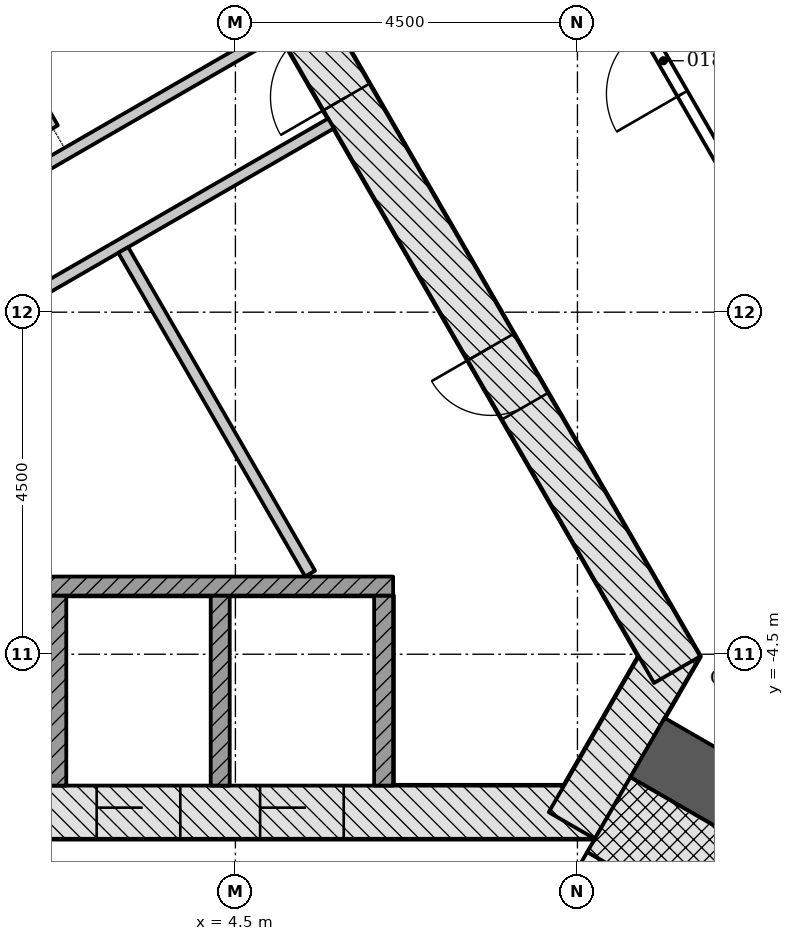
"""IFC4 building model, lengths in metres.
Left out: names, types, materials, properties, quantities, classifications, styles, units other than length and angle.
Written with IfcOpenShell. Run it as: python <this file> out.ifc"""

import sys

from ifc_helpers import new_model, si_unit, direction, frame, frame_2d, origin, place, context, subcontext, project, spatial, rectangle, extrude, element, fill, save


model = new_model("IFC4")
c1 = context("Model", 3, precision=1e-05, world=origin(), true_north=direction((0.0, 1.0)))
c2 = subcontext(c1, "Body", "Model", "MODEL_VIEW")
j1 = project(units=[si_unit("LENGTHUNIT", "METRE"), si_unit("PLANEANGLEUNIT", "RADIAN")], contexts=[c1])
p1 = place(None, origin())
s1 = spatial("IfcSite", under=j1, at=p1, CompositionType="ELEMENT")
p2 = place(p1, origin())
s2 = spatial("IfcBuilding", under=s1, at=p2, CompositionType="ELEMENT")
p3 = place(p2, frame((0.0, 0.0, 6.0)))
s3 = spatial("IfcBuildingStorey", under=s2, at=p3, CompositionType="ELEMENT", Elevation=6.0)
p4 = place(p3, frame((-9.229, -6.578, -0.25), z_axis=(0.0, 0.0, 1.0), x_axis=(1.0, 0.0, 0.0)))
e1 = element("IfcWall", 1, at=p4, inside=s3, PredefinedType="SHEAR", context=c2, shape_type="SweptSolid", body=[
    extrude(rectangle(XDim=18.458, YDim=0.7, at=frame_2d((9.229, 0.0))), origin(), (0.0, 0.0, 1.0), 4.5),
])
p5 = place(p4, frame((3.304, 0.0, 0.25)))
e2 = element("IfcOpeningElement", 2, at=p5, cuts=e1, PredefinedType="OPENING", context=c2, shape_type="SweptSolid", body=[
    extrude(rectangle(XDim=1.1, YDim=2.1, at=frame_2d((0.55, 1.05))), frame((0.0, 0.36, 0.0), z_axis=(0.0, -1.0, 0.0), x_axis=(1.0, 0.0, 0.0)), (0.0, 0.0, 1.0), 0.72),
])
p6 = place(p4, frame((5.454, 0.0, 0.25)))
e3 = element("IfcOpeningElement", 3, at=p6, cuts=e1, PredefinedType="OPENING", context=c2, shape_type="SweptSolid", body=[
    extrude(rectangle(XDim=1.1, YDim=2.1, at=frame_2d((0.55, 1.05))), frame((0.0, 0.36, 0.0), z_axis=(0.0, -1.0, 0.0), x_axis=(1.0, 0.0, 0.0)), (0.0, 0.0, 1.0), 0.72),
])
p7 = place(p4, frame((7.604, 0.0, 0.25)))
e4 = element("IfcOpeningElement", 4, at=p7, cuts=e1, PredefinedType="OPENING", context=c2, shape_type="SweptSolid", body=[
    extrude(rectangle(XDim=1.1, YDim=2.1, at=frame_2d((0.55, 1.05))), frame((0.0, 0.36, 0.0), z_axis=(0.0, -1.0, 0.0), x_axis=(1.0, 0.0, 0.0)), (0.0, 0.0, 1.0), 0.72),
])
p8 = place(p4, frame((9.754, 0.0, 0.25)))
e5 = element("IfcOpeningElement", 5, at=p8, cuts=e1, PredefinedType="OPENING", context=c2, shape_type="SweptSolid", body=[
    extrude(rectangle(XDim=1.1, YDim=2.1, at=frame_2d((0.55, 1.05))), frame((0.0, 0.36, 0.0), z_axis=(0.0, -1.0, 0.0), x_axis=(1.0, 0.0, 0.0)), (0.0, 0.0, 1.0), 0.72),
])
p9 = place(p4, frame((11.904, 0.0, 0.25)))
e6 = element("IfcOpeningElement", 6, at=p9, cuts=e1, PredefinedType="OPENING", context=c2, shape_type="SweptSolid", body=[
    extrude(rectangle(XDim=1.1, YDim=2.1, at=frame_2d((0.55, 1.05))), frame((0.0, 0.36, 0.0), z_axis=(0.0, -1.0, 0.0), x_axis=(1.0, 0.0, 0.0)), (0.0, 0.0, 1.0), 0.72),
])
p10 = place(p4, frame((14.054, 0.0, 0.25)))
e7 = element("IfcOpeningElement", 7, at=p10, cuts=e1, PredefinedType="OPENING", context=c2, shape_type="SweptSolid", body=[
    extrude(rectangle(XDim=1.1, YDim=2.1, at=frame_2d((0.55, 1.05))), frame((0.0, 0.36, 0.0), z_axis=(0.0, -1.0, 0.0), x_axis=(1.0, 0.0, 0.0)), (0.0, 0.0, 1.0), 0.72),
])
p11 = place(p4, frame((1.079, 0.0, 0.25)))
e8 = element("IfcOpeningElement", 8, at=p11, cuts=e1, PredefinedType="OPENING", context=c2, shape_type="SweptSolid", body=[
    extrude(rectangle(XDim=0.9, YDim=2.1, at=frame_2d((0.45, 1.05))), frame((0.0, 0.36, 0.0), z_axis=(0.0, -1.0, 0.0), x_axis=(1.0, 0.0, 0.0)), (0.0, 0.0, 1.0), 0.72),
])
p12 = place(p3, frame((8.926, -6.753, -0.25), z_axis=(0.0, 0.0, 1.0), x_axis=(0.500042739161, 0.866000726912, 0.0)))
e9 = element("IfcWall", 9, at=p12, inside=s3, PredefinedType="SHEAR", context=c2, shape_type="SweptSolid", body=[
    extrude(rectangle(XDim=2.771, YDim=0.7, at=frame_2d((1.386, 0.0))), origin(), (0.0, 0.0, 1.0), 4.5),
])
p13 = place(p3, frame((10.311, -4.703, -0.25), z_axis=(0.0, 0.0, 1.0), x_axis=(-0.500001446645, 0.866024568562, 0.0)))
e10 = element("IfcWall", 10, at=p13, inside=s3, PredefinedType="SHEAR", context=c2, shape_type="SweptSolid", body=[
    extrude(rectangle(XDim=18.458, YDim=0.7, at=frame_2d((9.229, 0.0))), origin(), (0.0, 0.0, 1.0), 4.5),
])
p14 = place(p13, frame((8.7, 0.0, 0.25)))
e11 = element("IfcOpeningElement", 11, at=p14, cuts=e10, PredefinedType="OPENING", context=c2, shape_type="SweptSolid", body=[
    extrude(rectangle(XDim=1.0, YDim=2.1, at=frame_2d((0.5, 1.05))), frame((0.0, 0.36, 0.0), z_axis=(0.0, -1.0, 0.0), x_axis=(1.0, 0.0, 0.0)), (0.0, 0.0, 1.0), 0.72),
])
p15 = place(p13, frame((4.002, 0.0, 0.25)))
e12 = element("IfcOpeningElement", 12, at=p15, cuts=e10, PredefinedType="OPENING", context=c2, shape_type="SweptSolid", body=[
    extrude(rectangle(XDim=0.9, YDim=2.1, at=frame_2d((0.45, 1.05))), frame((0.0, 0.36, 0.0), z_axis=(0.0, -1.0, 0.0), x_axis=(1.0, 0.0, 0.0)), (0.0, 0.0, 1.0), 0.72),
])
p16 = place(p13, frame((14.093, 0.0, 0.25)))
e13 = element("IfcOpeningElement", 13, at=p16, cuts=e10, PredefinedType="OPENING", context=c2, shape_type="SweptSolid", body=[
    extrude(rectangle(XDim=0.9, YDim=2.1, at=frame_2d((0.45, 1.05))), frame((0.0, 0.36, 0.0), z_axis=(0.0, -1.0, 0.0), x_axis=(1.0, 0.0, 0.0)), (0.0, 0.0, 1.0), 0.72),
])
p17 = place(p3, frame((9.922, -5.728, -0.25), z_axis=(0.0, 0.0, 1.0), x_axis=(0.866028046028, -0.499995423472, 0.0)))
e14 = element("IfcWall", 14, at=p17, inside=s3, PredefinedType="SHEAR", context=c2, shape_type="SweptSolid", body=[
    extrude(rectangle(XDim=14.633, YDim=0.9, at=frame_2d((7.316, 0.0))), origin(), (0.0, 0.0, 1.0), 4.5),
])
p18 = place(p17, frame((7.35, 0.0, 0.25)))
e15 = element("IfcOpeningElement", 15, at=p18, cuts=e14, PredefinedType="OPENING", context=c2, shape_type="SweptSolid", body=[
    extrude(rectangle(XDim=1.5, YDim=2.1, at=frame_2d((0.75, 1.05))), frame((0.0, 0.46, 0.0), z_axis=(0.0, -1.0, 0.0), x_axis=(1.0, 0.0, 0.0)), (0.0, 0.0, 1.0), 0.92),
])
for number, where, z_axis, x_axis in (
    (16, (2.15, -6.228, -0.25), (0.0, 0.0, 1.0), (0.0, 1.0, 0.0)),
    (17, (4.3, -6.228, -0.25), (0.0, 0.0, 1.0), (0.0, 1.0, 0.0)),
    (18, (6.45, -6.228, -0.25), (0.0, 0.0, 1.0), (0.0, 1.0, 0.0)),
):
    element("IfcWall", number, at=place(p3, frame(where, z_axis=z_axis, x_axis=x_axis)), inside=s3, PredefinedType="PARTITIONING", context=c2, shape_type="SweptSolid", body=[
        extrude(rectangle(XDim=2.5, YDim=0.25, at=frame_2d((1.25, 0.0))), origin(), (0.0, 0.0, 1.0), 4.5),
    ])
p19 = place(p3, frame((-6.575, -3.603, 0.0), z_axis=(0.0, 0.0, 1.0), x_axis=(1.0, 0.0, 0.0)))
e19 = element("IfcWall", 19, at=p19, inside=s3, PredefinedType="PARTITIONING", context=c2, shape_type="SweptSolid", body=[
    extrude(rectangle(XDim=13.15, YDim=0.25, at=frame_2d((6.575, 0.0))), origin(), (0.0, 0.0, 1.0), 4.25),
])
p20 = place(p3, frame((-4.548, -1.851, 0.0), z_axis=(0.0, 0.0, 1.0), x_axis=(0.866023939251, 0.500002536638, 0.0)))
e20 = element("IfcWall", 20, at=p20, inside=s3, PredefinedType="PARTITIONING", context=c2, shape_type="SweptSolid", body=[
    extrude(rectangle(XDim=11.092, YDim=0.15, at=frame_2d((5.546, 0.0))), origin(), (0.0, 0.0, 1.0), 4.25),
])
p21 = place(p20, frame((3.497, 0.0, 0.0)))
e21 = element("IfcOpeningElement", 21, at=p21, cuts=e20, PredefinedType="OPENING", context=c2, shape_type="SweptSolid", body=[
    extrude(rectangle(XDim=0.9, YDim=2.1, at=frame_2d((0.45, 1.05))), frame((0.0, 0.085, 0.0), z_axis=(0.0, -1.0, 0.0), x_axis=(1.0, 0.0, 0.0)), (0.0, 0.0, 1.0), 0.17),
])
p22 = place(p3, frame((2.099, 2.42, 0.0), z_axis=(0.0, 0.0, 1.0), x_axis=(-0.499998449073, 0.866026299211, 0.0)))
e22 = element("IfcWall", 22, at=p22, inside=s3, PredefinedType="PARTITIONING", context=c2, shape_type="SweptSolid", body=[
    extrude(rectangle(XDim=4.211, YDim=0.15, at=frame_2d((2.106, 0.0))), origin(), (0.0, 0.0, 1.0), 4.25),
])
p23 = place(p3, frame((-4.454, -3.413, 0.0), z_axis=(0.0, 0.0, 1.0), x_axis=(0.86603043987, 0.499991277142, 0.0)))
e23 = element("IfcWall", 23, at=p23, inside=s3, PredefinedType="PARTITIONING", context=c2, shape_type="SweptSolid", body=[
    extrude(rectangle(XDim=11.792, YDim=0.15, at=frame_2d((5.896, 0.0))), origin(), (0.0, 0.0, 1.0), 4.25),
])
p24 = place(p23, frame((3.847, 0.0, 0.0)))
e24 = element("IfcOpeningElement", 24, at=p24, cuts=e23, PredefinedType="OPENING", context=c2, shape_type="SweptSolid", body=[
    extrude(rectangle(XDim=0.9, YDim=2.1, at=frame_2d((0.45, 1.05))), frame((0.0, 0.085, 0.0), z_axis=(0.0, -1.0, 0.0), x_axis=(1.0, 0.0, 0.0)), (0.0, 0.0, 1.0), 0.17),
])
p25 = place(p3, frame((5.482, -3.439, 0.0), z_axis=(0.0, 0.0, 1.0), x_axis=(-0.500006183238, 0.866021833861, 0.0)))
e25 = element("IfcWall", 25, at=p25, inside=s3, PredefinedType="PARTITIONING", context=c2, shape_type="SweptSolid", body=[
    extrude(rectangle(XDim=4.916, YDim=0.15, at=frame_2d((2.458, 0.0))), origin(), (0.0, 0.0, 1.0), 4.25),
])
p26 = place(p3, frame((7.44, -10.226, -0.25), z_axis=(0.0, 0.0, 1.0), x_axis=(0.500022077904, 0.866012656725, 0.0)))
e26 = element("IfcWall", 26, at=p26, inside=s3, PredefinedType="SHEAR", context=c2, shape_type="SweptSolid", body=[
    extrude(rectangle(XDim=3.55, YDim=0.2, at=frame_2d((1.775, 0.0))), origin(), (0.0, 0.0, 1.0), 4.5),
])
p27 = place(p26, frame((1.175, 0.0, 0.25)))
e27 = element("IfcOpeningElement", 27, at=p27, cuts=e26, PredefinedType="OPENING", context=c2, shape_type="SweptSolid", body=[
    extrude(rectangle(XDim=1.2, YDim=2.1, at=frame_2d((0.6, 1.05))), frame((0.0, 0.11, 0.0), z_axis=(0.0, -1.0, 0.0), x_axis=(1.0, 0.0, 0.0)), (0.0, 0.0, 1.0), 0.22),
])
p28 = place(p3, frame((9.413, -6.61, -0.25), z_axis=(0.0, 0.0, 1.0), x_axis=(0.866018442252, -0.500012057535, 0.0)))
e28 = element("IfcWall", 28, at=p28, inside=s3, PredefinedType="SHEAR", context=c2, shape_type="SweptSolid", body=[
    extrude(rectangle(XDim=7.2, YDim=1.136, at=frame_2d((3.6, 0.0))), origin(), (0.0, 0.0, 1.0), 4.5),
])
p29 = place(p3, frame((11.206, 1.446, 0.0), z_axis=(0.0, 0.0, 1.0), x_axis=(-0.500044734646, 0.865999574684, 0.0)))
e29 = element("IfcWall", 29, at=p29, inside=s3, PredefinedType="PARTITIONING", context=c2, shape_type="SweptSolid", body=[
    extrude(rectangle(XDim=4.35, YDim=0.15, at=frame_2d((2.175, 0.0))), origin(), (0.0, 0.0, 1.0), 3.638),
])
p30 = place(p29, frame((1.65, 0.0, 0.0)))
e30 = element("IfcOpeningElement", 30, at=p30, cuts=e29, PredefinedType="OPENING", context=c2, shape_type="SweptSolid", body=[
    extrude(rectangle(XDim=1.0, YDim=2.1, at=frame_2d((0.5, 1.05))), frame((0.0, 0.085, 0.0), z_axis=(0.0, -1.0, 0.0), x_axis=(1.0, 0.0, 0.0)), (0.0, 0.0, 1.0), 0.17),
])
p31 = place(p9, origin())
e31 = element("IfcDoor", 31, at=p31, inside=s3, OperationType="DOUBLE_DOOR_SLIDING", PredefinedType="DOOR", context=c2, shape_type="SweptSolid", body=[
    extrude(rectangle(XDim=1.1, YDim=2.1, at=frame_2d((0.55, 1.05))), frame((0.0, 0.025, 0.0), z_axis=(0.0, -1.0, 0.0), x_axis=(1.0, 0.0, 0.0)), (0.0, 0.0, 1.0), 0.05),
])
fill(e6, e31)
p32 = place(p10, origin())
e32 = element("IfcDoor", 32, at=p32, inside=s3, OperationType="DOUBLE_DOOR_SLIDING", PredefinedType="DOOR", context=c2, shape_type="SweptSolid", body=[
    extrude(rectangle(XDim=1.1, YDim=2.1, at=frame_2d((0.55, 1.05))), frame((0.0, 0.025, 0.0), z_axis=(0.0, -1.0, 0.0), x_axis=(1.0, 0.0, 0.0)), (0.0, 0.0, 1.0), 0.05),
])
fill(e7, e32)
p33 = place(p14, origin())
e33 = element("IfcDoor", 33, at=p33, inside=s3, OperationType="SINGLE_SWING_LEFT", PredefinedType="DOOR", context=c2, shape_type="SweptSolid", body=[
    extrude(rectangle(XDim=1.0, YDim=2.1, at=frame_2d((0.5, 1.05))), frame((0.0, 0.075, 0.0), z_axis=(0.0, -1.0, 0.0), x_axis=(1.0, 0.0, 0.0)), (0.0, 0.0, 1.0), 0.15),
])
fill(e11, e33)
p34 = place(p15, origin())
e34 = element("IfcDoor", 34, at=p34, inside=s3, OperationType="SINGLE_SWING_RIGHT", PredefinedType="DOOR", context=c2, shape_type="SweptSolid", body=[
    extrude(rectangle(XDim=0.9, YDim=2.1, at=frame_2d((0.45, 1.05))), frame((0.0, 0.075, 0.0), z_axis=(0.0, -1.0, 0.0), x_axis=(1.0, 0.0, 0.0)), (0.0, 0.0, 1.0), 0.15),
])
fill(e12, e34)
p35 = place(p30, origin())
e35 = element("IfcDoor", 35, at=p35, inside=s3, OperationType="SINGLE_SWING_RIGHT", PredefinedType="DOOR", context=c2, shape_type="SweptSolid", body=[
    extrude(rectangle(XDim=1.0, YDim=2.1, at=frame_2d((0.5, 1.05))), frame((0.0, 0.025, 0.0), z_axis=(0.0, -1.0, 0.0), x_axis=(1.0, 0.0, 0.0)), (0.0, 0.0, 1.0), 0.05),
])
fill(e30, e35)
save(model, sys.argv[1])
